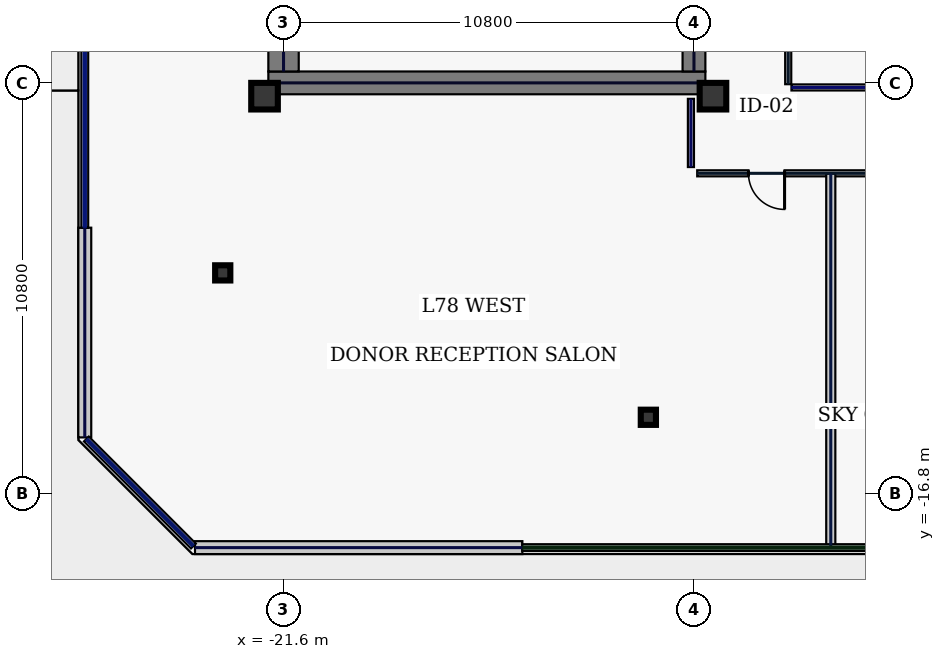
"""IFC4 building model, lengths in metres.
Left out: names, types, materials, properties, quantities, classifications, styles, units other than length and angle.
Written with IfcOpenShell. Run it as: python <this file> out.ifc"""

import sys

from ifc_helpers import new_model, si_unit, direction, frame, frame_2d, origin, origin_2d, place, context, subcontext, project, spatial, rectangle, hollow_rectangle, extrude, element, fill, save


model = new_model("IFC4")
c1 = context("Model", 3, precision=1e-05, world=origin(), true_north=direction((0.0, 1.0)))
c2 = subcontext(c1, "Body", "Model", "MODEL_VIEW")
j1 = project(units=[si_unit("LENGTHUNIT", "METRE"), si_unit("PLANEANGLEUNIT", "RADIAN")], contexts=[c1])
p1 = place(None, origin())
s1 = spatial("IfcSite", under=j1, at=p1, CompositionType="ELEMENT")
p2 = place(p1, origin())
s2 = spatial("IfcBuilding", under=s1, at=p2, CompositionType="ELEMENT")
p3 = place(p2, frame((0.0, 0.0, 333.0)))
s3 = spatial("IfcBuildingStorey", under=s2, at=p3, CompositionType="ELEMENT", Elevation=333.0)
p4 = place(p3, frame((-22.0, -6.0, 0.0), z_axis=(0.0, 0.0, 1.0), x_axis=(1.0, 0.0, 0.0)))
e1 = element("IfcWall", 1, at=p4, inside=s3, PredefinedType="SHEAR", context=c2, shape_type="SweptSolid", body=[
    extrude(rectangle(XDim=11.5, YDim=0.6, at=frame_2d((5.75, 0.0))), origin(), (0.0, 0.0, 1.0), 6.5),
])
p5 = place(p3, frame((-21.6, -5.7, 0.0), z_axis=(0.0, 0.0, 1.0), x_axis=(0.0, 1.0, 0.0)))
e2 = element("IfcWall", 2, at=p5, inside=s3, PredefinedType="SHEAR", context=c2, shape_type="SweptSolid", body=[
    extrude(rectangle(XDim=11.4, YDim=0.8, at=frame_2d((5.7, 0.0))), origin(), (0.0, 0.0, 1.0), 6.5),
])
p6 = place(p3, frame((-10.8, -5.7, 0.0), z_axis=(0.0, 0.0, 1.0), x_axis=(0.0, 1.0, 0.0)))
e3 = element("IfcWall", 3, at=p6, inside=s3, PredefinedType="SHEAR", context=c2, shape_type="SweptSolid", body=[
    extrude(rectangle(XDim=3.05, YDim=0.6, at=frame_2d((1.525, 0.0))), origin(), (0.0, 0.0, 1.0), 6.5),
])
for number, where, z_axis, x_axis in (
    (4, (-22.1, -6.35, 0.0), (0.0, 0.0, 1.0), (1.0, 0.0, 0.0)),
    (5, (-10.3, -6.35, 0.0), (0.0, 0.0, 1.0), (1.0, 0.0, 0.0)),
):
    element("IfcColumn", number, at=place(p3, frame(where, z_axis=z_axis, x_axis=x_axis)), inside=s3, PredefinedType="COLUMN", context=c2, shape_type="SweptSolid", body=[
        extrude(hollow_rectangle(XDim=0.7, YDim=0.7, WallThickness=0.032, at=origin_2d()), origin(), (0.0, 0.0, 1.0), 6.5),
    ])
for number, where, z_axis, x_axis in (
    (6, (-23.2, -11.0, 0.0), (0.0, 0.0, 1.0), (1.0, 0.0, 0.0)),
    (7, (-12.0, -14.8, 0.0), (0.0, 0.0, 1.0), (1.0, 0.0, 0.0)),
):
    element("IfcColumn", number, at=place(p3, frame(where, z_axis=z_axis, x_axis=x_axis)), inside=s3, PredefinedType="COLUMN", context=c2, shape_type="SweptSolid", body=[
        extrude(hollow_rectangle(XDim=0.4, YDim=0.4, WallThickness=0.02, at=origin_2d()), origin(), (0.0, 0.0, 1.0), 6.5),
    ])
p7 = place(p3, frame((23.822, -18.756, 0.0), z_axis=(0.0, 0.0, 1.0), x_axis=(-0.97437013751, -0.22495073934, 0.0)))
e8 = element("IfcWall", 8, at=p7, inside=s3, PredefinedType="PARAPET", context=c2, shape_type="SweptSolid", body=[
    extrude(rectangle(XDim=48.859, YDim=0.25, at=frame_2d((24.43, 0.0))), origin(), (0.0, 0.0, 1.0), 1.15),
])
p8 = place(p3, frame((-26.83, -15.33, 0.0), z_axis=(0.0, 0.0, 1.0), x_axis=(0.0, 1.0, 0.0)))
e9 = element("IfcWall", 9, at=p8, inside=s3, PredefinedType="STANDARD", context=c2, shape_type="SweptSolid", body=[
    extrude(rectangle(XDim=5.519, YDim=0.34, at=frame_2d((2.76, 0.0))), origin(), (0.0, 0.0, 1.0), 6.5),
])
p9 = place(p3, frame((-15.315, -18.23, 0.0), z_axis=(0.0, 0.0, 1.0), x_axis=(-1.0, 0.0, 0.0)))
e10 = element("IfcWall", 10, at=p9, inside=s3, PredefinedType="STANDARD", context=c2, shape_type="SweptSolid", body=[
    extrude(rectangle(XDim=8.614, YDim=0.34, at=frame_2d((4.307, 0.0))), origin(), (0.0, 0.0, 1.0), 6.5),
])
p10 = place(p3, frame((-10.88, -8.215, 0.0), z_axis=(0.0, 0.0, 1.0), x_axis=(0.0, 1.0, 0.0)))
e11 = element("IfcWall", 11, at=p10, inside=s3, PredefinedType="PARTITIONING", context=c2, shape_type="SweptSolid", body=[
    extrude(rectangle(XDim=1.795, YDim=0.16, at=frame_2d((0.897, 0.0))), origin(), (0.0, 0.0, 1.0), 4.895),
])
p11 = place(p3, frame((10.715, -8.38, 0.0), z_axis=(0.0, 0.0, 1.0), x_axis=(-1.0, 0.0, 0.0)))
e12 = element("IfcWall", 12, at=p11, inside=s3, PredefinedType="PARTITIONING", context=c2, shape_type="SweptSolid", body=[
    extrude(rectangle(XDim=21.43, YDim=0.16, at=frame_2d((10.715, 0.0))), origin(), (0.0, 0.0, 1.0), 6.5),
])
p12 = place(p11, frame((13.925, 0.0, 0.0)))
e13 = element("IfcOpeningElement", 13, at=p12, cuts=e12, PredefinedType="OPENING", context=c2, shape_type="SweptSolid", body=[
    extrude(rectangle(XDim=0.95, YDim=2.2, at=frame_2d((0.475, 1.1))), frame((0.0, 0.09, 0.0), z_axis=(0.0, -1.0, 0.0), x_axis=(1.0, 0.0, 0.0)), (0.0, 0.0, 1.0), 0.18),
])
p13 = place(p11, frame((6.725, 0.0, 0.0)))
e14 = element("IfcOpeningElement", 14, at=p13, cuts=e12, PredefinedType="OPENING", context=c2, shape_type="SweptSolid", body=[
    extrude(rectangle(XDim=0.95, YDim=2.2, at=frame_2d((0.475, 1.1))), frame((0.0, 0.09, 0.0), z_axis=(0.0, -1.0, 0.0), x_axis=(1.0, 0.0, 0.0)), (0.0, 0.0, 1.0), 0.18),
])
p14 = place(p11, frame((19.131, 0.0, 0.0)))
e15 = element("IfcOpeningElement", 15, at=p14, cuts=e12, PredefinedType="OPENING", context=c2, shape_type="SweptSolid", body=[
    extrude(rectangle(XDim=0.95, YDim=2.2, at=frame_2d((0.475, 1.1))), frame((0.0, 0.09, 0.0), z_axis=(0.0, -1.0, 0.0), x_axis=(1.0, 0.0, 0.0)), (0.0, 0.0, 1.0), 0.18),
])
p15 = place(p11, frame((1.519, 0.0, 0.0)))
e16 = element("IfcOpeningElement", 16, at=p15, cuts=e12, PredefinedType="OPENING", context=c2, shape_type="SweptSolid", body=[
    extrude(rectangle(XDim=0.95, YDim=2.2, at=frame_2d((0.475, 1.1))), frame((0.0, 0.09, 0.0), z_axis=(0.0, -1.0, 0.0), x_axis=(1.0, 0.0, 0.0)), (0.0, 0.0, 1.0), 0.18),
])
p16 = place(p3, frame((-8.32, 6.035, 0.0), z_axis=(0.0, 0.0, 1.0), x_axis=(0.0, -1.0, 0.0)))
e17 = element("IfcWall", 17, at=p16, inside=s3, PredefinedType="PARTITIONING", context=c2, shape_type="SweptSolid", body=[
    extrude(rectangle(XDim=12.07, YDim=0.16, at=frame_2d((6.035, 0.0))), origin(), (0.0, 0.0, 1.0), 6.5),
])
p17 = place(p3, frame((-8.235, -6.12, 0.0), z_axis=(0.0, 0.0, 1.0), x_axis=(1.0, 0.0, 0.0)))
e18 = element("IfcWall", 18, at=p17, inside=s3, PredefinedType="PARTITIONING", context=c2, shape_type="SweptSolid", body=[
    extrude(rectangle(XDim=16.47, YDim=0.16, at=frame_2d((8.235, 0.0))), origin(), (0.0, 0.0, 1.0), 5.795),
])
p18 = place(p3, frame((-7.2, -18.24, 0.0), z_axis=(0.0, 0.0, 1.0), x_axis=(0.0, 1.0, 0.0)))
e19 = element("IfcWall", 19, at=p18, inside=s3, PredefinedType="PARTITIONING", context=c2, shape_type="SweptSolid", body=[
    extrude(rectangle(XDim=9.855, YDim=0.24, at=frame_2d((4.927, 0.0))), origin(), (0.0, 0.0, 1.0), 6.5),
])
p19 = place(p14, origin())
e20 = element("IfcDoor", 20, at=p19, inside=s3, OperationType="SINGLE_SWING_LEFT", PredefinedType="DOOR", context=c2, shape_type="SweptSolid", body=[
    extrude(rectangle(XDim=0.95, YDim=2.2, at=frame_2d((0.475, 1.1))), frame((0.0, 0.025, 0.0), z_axis=(0.0, -1.0, 0.0), x_axis=(1.0, 0.0, 0.0)), (0.0, 0.0, 1.0), 0.05),
])
fill(e15, e20)
save(model, sys.argv[1])
